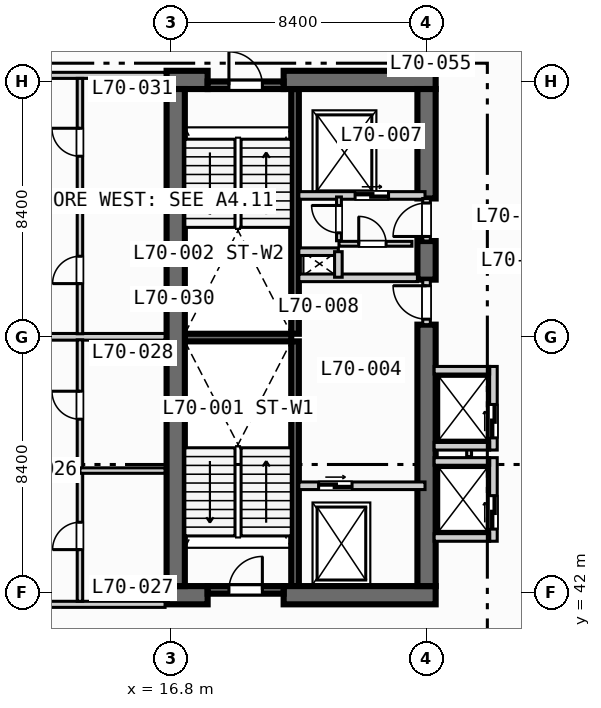
"""IFC4 building model, lengths in metres.
Left out: names, types, materials, properties, quantities, classifications, styles, units other than length and angle.
Written with IfcOpenShell. Run it as: python <this file> out.ifc"""

import sys

from ifc_helpers import new_model, si_unit, direction, frame, frame_2d, origin, place, context, subcontext, project, spatial, rectangle, extrude, element, fill, save


model = new_model("IFC4")
c1 = context("Model", 3, precision=1e-05, world=origin(), true_north=direction((0.0, 1.0)))
c2 = subcontext(c1, "Body", "Model", "MODEL_VIEW")
j1 = project(units=[si_unit("LENGTHUNIT", "METRE"), si_unit("PLANEANGLEUNIT", "RADIAN")], contexts=[c1])
p1 = place(None, origin())
s1 = spatial("IfcSite", under=j1, at=p1, CompositionType="ELEMENT")
p2 = place(p1, origin())
s2 = spatial("IfcBuilding", under=s1, at=p2, CompositionType="ELEMENT")
p3 = place(p2, frame((0.0, 0.0, 282.3)))
s3 = spatial("IfcBuildingStorey", under=s2, at=p3, CompositionType="ELEMENT", Elevation=282.3)
for number, where, z_axis, x_axis in (
    (1, (20.875, 42.2, 0.0), (0.0, 0.0, 1.0), (0.0, 1.0, 0.0)),
    (2, (20.875, 50.5, 0.0), (0.0, 0.0, 1.0), (0.0, 1.0, 0.0)),
):
    element("IfcWall", number, at=place(p3, frame(where, z_axis=z_axis, x_axis=x_axis)), inside=s3, PredefinedType="SOLIDWALL", context=c2, shape_type="SweptSolid", body=[
        extrude(rectangle(XDim=8.05, YDim=0.25, at=frame_2d((4.025, 0.0))), origin(), (0.0, 0.0, 1.0), 3.47),
    ])
p4 = place(p3, frame((17.25, 50.375, 0.0), z_axis=(0.0, 0.0, 1.0), x_axis=(1.0, 0.0, 0.0)))
e3 = element("IfcWall", 3, at=p4, inside=s3, PredefinedType="SOLIDWALL", context=c2, shape_type="SweptSolid", body=[
    extrude(rectangle(XDim=3.5, YDim=0.25, at=frame_2d((1.75, 0.0))), origin(), (0.0, 0.0, 1.0), 3.47),
])
p5 = place(p3, frame((16.65, 41.9, 0.0), z_axis=(0.0, 0.0, 1.0), x_axis=(1.0, 0.0, 0.0)))
e4 = element("IfcWall", 4, at=p5, inside=s3, PredefinedType="SHEAR", context=c2, shape_type="SweptSolid", body=[
    extrude(rectangle(XDim=1.35, YDim=0.6, at=frame_2d((0.675, 0.0))), origin(), (0.0, 0.0, 1.0), 3.47),
])
p6 = place(p3, frame((20.5, 41.9, 0.0), z_axis=(0.0, 0.0, 1.0), x_axis=(1.0, 0.0, 0.0)))
e5 = element("IfcWall", 5, at=p6, inside=s3, PredefinedType="SHEAR", context=c2, shape_type="SweptSolid", body=[
    extrude(rectangle(XDim=5.0, YDim=0.6, at=frame_2d((2.5, 0.0))), origin(), (0.0, 0.0, 1.0), 3.47),
])
p7 = place(p3, frame((16.65, 58.85, 0.0), z_axis=(0.0, 0.0, 1.0), x_axis=(1.0, 0.0, 0.0)))
e6 = element("IfcWall", 6, at=p7, inside=s3, PredefinedType="SHEAR", context=c2, shape_type="SweptSolid", body=[
    extrude(rectangle(XDim=1.35, YDim=0.6, at=frame_2d((0.675, 0.0))), origin(), (0.0, 0.0, 1.0), 3.47),
])
p8 = place(p3, frame((20.5, 58.85, 0.0), z_axis=(0.0, 0.0, 1.0), x_axis=(1.0, 0.0, 0.0)))
e7 = element("IfcWall", 7, at=p8, inside=s3, PredefinedType="SHEAR", context=c2, shape_type="SweptSolid", body=[
    extrude(rectangle(XDim=5.0, YDim=0.6, at=frame_2d((2.5, 0.0))), origin(), (0.0, 0.0, 1.0), 3.47),
])
p9 = place(p3, frame((16.95, 42.2, 0.0), z_axis=(0.0, 0.0, 1.0), x_axis=(0.0, 1.0, 0.0)))
e8 = element("IfcWall", 8, at=p9, inside=s3, PredefinedType="SHEAR", context=c2, shape_type="SweptSolid", body=[
    extrude(rectangle(XDim=16.35, YDim=0.6, at=frame_2d((8.175, 0.0))), origin(), (0.0, 0.0, 1.0), 3.47),
])
p10 = place(p3, frame((25.2, 42.2, 0.0), z_axis=(0.0, 0.0, 1.0), x_axis=(0.0, 1.0, 0.0)))
e9 = element("IfcWall", 9, at=p10, inside=s3, PredefinedType="SHEAR", context=c2, shape_type="SweptSolid", body=[
    extrude(rectangle(XDim=8.6, YDim=0.6, at=frame_2d((4.3, 0.0))), origin(), (0.0, 0.0, 1.0), 3.47),
])
p11 = place(p3, frame((25.2, 52.28, 0.0), z_axis=(0.0, 0.0, 1.0), x_axis=(0.0, 1.0, 0.0)))
e10 = element("IfcWall", 10, at=p11, inside=s3, PredefinedType="SHEAR", context=c2, shape_type="SweptSolid", body=[
    extrude(rectangle(XDim=1.27, YDim=0.6, at=frame_2d((0.635, 0.0))), origin(), (0.0, 0.0, 1.0), 3.47),
])
p12 = place(p3, frame((25.2, 54.95, 0.0), z_axis=(0.0, 0.0, 1.0), x_axis=(0.0, 1.0, 0.0)))
e11 = element("IfcWall", 11, at=p12, inside=s3, PredefinedType="SHEAR", context=c2, shape_type="SweptSolid", body=[
    extrude(rectangle(XDim=3.6, YDim=0.6, at=frame_2d((1.8, 0.0))), origin(), (0.0, 0.0, 1.0), 3.47),
])
p13 = place(p3, frame((18.0, 42.075, 0.0), z_axis=(0.0, 0.0, 1.0), x_axis=(1.0, 0.0, 0.0)))
e12 = element("IfcWall", 12, at=p13, inside=s3, PredefinedType="SOLIDWALL", context=c2, shape_type="SweptSolid", body=[
    extrude(rectangle(XDim=2.5, YDim=0.25, at=frame_2d((1.25, 0.0))), origin(), (0.0, 0.0, 1.0), 3.47),
])
p14 = place(p13, frame((0.7, 0.0, 0.0)))
e13 = element("IfcOpeningElement", 13, at=p14, cuts=e12, PredefinedType="OPENING", context=c2, shape_type="SweptSolid", body=[
    extrude(rectangle(XDim=1.1, YDim=2.15, at=frame_2d((0.55, 1.075))), frame((0.0, 0.135, 0.0), z_axis=(0.0, -1.0, 0.0), x_axis=(1.0, 0.0, 0.0)), (0.0, 0.0, 1.0), 0.27),
])
p15 = place(p3, frame((18.0, 58.675, 0.0), z_axis=(0.0, 0.0, 1.0), x_axis=(1.0, 0.0, 0.0)))
e14 = element("IfcWall", 14, at=p15, inside=s3, PredefinedType="SOLIDWALL", context=c2, shape_type="SweptSolid", body=[
    extrude(rectangle(XDim=2.5, YDim=0.25, at=frame_2d((1.25, 0.0))), origin(), (0.0, 0.0, 1.0), 3.47),
])
p16 = place(p15, frame((0.7, 0.0, 0.0)))
e15 = element("IfcOpeningElement", 15, at=p16, cuts=e14, PredefinedType="OPENING", context=c2, shape_type="SweptSolid", body=[
    extrude(rectangle(XDim=1.1, YDim=2.15, at=frame_2d((0.55, 1.075))), frame((0.0, 0.135, 0.0), z_axis=(0.0, -1.0, 0.0), x_axis=(1.0, 0.0, 0.0)), (0.0, 0.0, 1.0), 0.27),
])
p17 = place(p3, frame((21.0, 45.5, 0.0), z_axis=(0.0, 0.0, 1.0), x_axis=(1.0, 0.0, 0.0)))
e16 = element("IfcWall", 16, at=p17, inside=s3, PredefinedType="SOLIDWALL", context=c2, shape_type="SweptSolid", body=[
    extrude(rectangle(XDim=4.15, YDim=0.25, at=frame_2d((2.075, 0.0))), origin(), (0.0, 0.0, 1.0), 3.47),
])
p18 = place(p17, frame((0.65, 0.0, 0.0)))
e17 = element("IfcOpeningElement", 17, at=p18, cuts=e16, PredefinedType="OPENING", context=c2, shape_type="SweptSolid", body=[
    extrude(rectangle(XDim=1.1, YDim=2.15, at=frame_2d((0.55, 1.075))), frame((0.0, 0.135, 0.0), z_axis=(0.0, -1.0, 0.0), x_axis=(1.0, 0.0, 0.0)), (0.0, 0.0, 1.0), 0.27),
])
p19 = place(p3, frame((25.2, 50.8, 0.0), z_axis=(0.0, 0.0, 1.0), x_axis=(0.0, 1.0, 0.0)))
e18 = element("IfcWall", 18, at=p19, inside=s3, PredefinedType="SOLIDWALL", context=c2, shape_type="SweptSolid", body=[
    extrude(rectangle(XDim=1.48, YDim=0.25, at=frame_2d((0.74, 0.0))), origin(), (0.0, 0.0, 1.0), 3.47),
])
p20 = place(p19, frame((0.18, 0.0, 0.0)))
e19 = element("IfcOpeningElement", 19, at=p20, cuts=e18, PredefinedType="OPENING", context=c2, shape_type="SweptSolid", body=[
    extrude(rectangle(XDim=1.1, YDim=2.15, at=frame_2d((0.55, 1.075))), frame((0.0, 0.135, 0.0), z_axis=(0.0, -1.0, 0.0), x_axis=(1.0, 0.0, 0.0)), (0.0, 0.0, 1.0), 0.27),
])
p21 = place(p3, frame((21.0, 52.34, 0.0), z_axis=(0.0, 0.0, 1.0), x_axis=(1.0, 0.0, 0.0)))
e20 = element("IfcWall", 20, at=p21, inside=s3, PredefinedType="SOLIDWALL", context=c2, shape_type="SweptSolid", body=[
    extrude(rectangle(XDim=3.9, YDim=0.25, at=frame_2d((1.95, 0.0))), origin(), (0.0, 0.0, 1.0), 3.47),
])
p22 = place(p3, frame((21.0, 55.05, 0.0), z_axis=(0.0, 0.0, 1.0), x_axis=(1.0, 0.0, 0.0)))
e21 = element("IfcWall", 21, at=p22, inside=s3, PredefinedType="SOLIDWALL", context=c2, shape_type="SweptSolid", body=[
    extrude(rectangle(XDim=4.15, YDim=0.25, at=frame_2d((2.075, 0.0))), origin(), (0.0, 0.0, 1.0), 3.47),
])
p23 = place(p22, frame((1.85, 0.0, 0.0)))
e22 = element("IfcOpeningElement", 22, at=p23, cuts=e21, PredefinedType="OPENING", context=c2, shape_type="SweptSolid", body=[
    extrude(rectangle(XDim=1.1, YDim=2.15, at=frame_2d((0.55, 1.075))), frame((0.0, 0.135, 0.0), z_axis=(0.0, -1.0, 0.0), x_axis=(1.0, 0.0, 0.0)), (0.0, 0.0, 1.0), 0.27),
])
p24 = place(p3, frame((25.2, 53.55, 0.0), z_axis=(0.0, 0.0, 1.0), x_axis=(0.0, 1.0, 0.0)))
e23 = element("IfcWall", 23, at=p24, inside=s3, PredefinedType="SOLIDWALL", context=c2, shape_type="SweptSolid", body=[
    extrude(rectangle(XDim=1.4, YDim=0.25, at=frame_2d((0.7, 0.0))), origin(), (0.0, 0.0, 1.0), 3.47),
])
p25 = place(p24, frame((0.15, 0.0, 0.0)))
e24 = element("IfcOpeningElement", 24, at=p25, cuts=e23, PredefinedType="OPENING", context=c2, shape_type="SweptSolid", body=[
    extrude(rectangle(XDim=1.1, YDim=2.15, at=frame_2d((0.55, 1.075))), frame((0.0, 0.135, 0.0), z_axis=(0.0, -1.0, 0.0), x_axis=(1.0, 0.0, 0.0)), (0.0, 0.0, 1.0), 0.27),
])
p26 = place(p3, frame((21.0, 53.2, 0.0), z_axis=(0.0, 0.0, 1.0), x_axis=(1.0, 0.0, 0.0)))
e25 = element("IfcWall", 25, at=p26, inside=s3, PredefinedType="SOLIDWALL", context=c2, shape_type="SweptSolid", body=[
    extrude(rectangle(XDim=1.3, YDim=0.25, at=frame_2d((0.65, 0.0))), origin(), (0.0, 0.0, 1.0), 3.47),
])
p27 = place(p3, frame((22.3, 52.36, 0.0), z_axis=(0.0, 0.0, 1.0), x_axis=(0.0, 1.0, 0.0)))
e26 = element("IfcWall", 26, at=p27, inside=s3, PredefinedType="SOLIDWALL", context=c2, shape_type="SweptSolid", body=[
    extrude(rectangle(XDim=0.84, YDim=0.25, at=frame_2d((0.42, 0.0))), origin(), (0.0, 0.0, 1.0), 3.47),
])
p28 = place(p3, frame((22.32, 53.56, 0.0), z_axis=(0.0, 0.0, 1.0), x_axis=(0.0, 1.0, 0.0)))
e27 = element("IfcWall", 27, at=p28, inside=s3, PredefinedType="PARTITIONING", context=c2, shape_type="SweptSolid", body=[
    extrude(rectangle(XDim=1.44, YDim=0.16, at=frame_2d((0.72, 0.0))), origin(), (0.0, 0.0, 1.0), 3.47),
])
p29 = place(p28, frame((0.26, 0.0, 0.0)))
e28 = element("IfcOpeningElement", 28, at=p29, cuts=e27, PredefinedType="OPENING", context=c2, shape_type="SweptSolid", body=[
    extrude(rectangle(XDim=0.9, YDim=2.1, at=frame_2d((0.45, 1.05))), frame((0.0, 0.09, 0.0), z_axis=(0.0, -1.0, 0.0), x_axis=(1.0, 0.0, 0.0)), (0.0, 0.0, 1.0), 0.18),
])
p30 = place(p3, frame((22.32, 53.46, 0.0), z_axis=(0.0, 0.0, 1.0), x_axis=(1.0, 0.0, 0.0)))
e29 = element("IfcWall", 29, at=p30, inside=s3, PredefinedType="PARTITIONING", context=c2, shape_type="SweptSolid", body=[
    extrude(rectangle(XDim=2.4, YDim=0.16, at=frame_2d((1.2, 0.0))), origin(), (0.0, 0.0, 1.0), 3.47),
])
p31 = place(p30, frame((0.65, 0.0, 0.0)))
e30 = element("IfcOpeningElement", 30, at=p31, cuts=e29, PredefinedType="OPENING", context=c2, shape_type="SweptSolid", body=[
    extrude(rectangle(XDim=0.9, YDim=2.1, at=frame_2d((0.45, 1.05))), frame((0.0, 0.09, 0.0), z_axis=(0.0, -1.0, 0.0), x_axis=(1.0, 0.0, 0.0)), (0.0, 0.0, 1.0), 0.18),
])
p32 = place(p3, frame((27.4, 43.675, 0.0), z_axis=(0.0, 0.0, 1.0), x_axis=(0.0, 1.0, 0.0)))
e31 = element("IfcWall", 31, at=p32, inside=s3, PredefinedType="SOLIDWALL", context=c2, shape_type="SweptSolid", body=[
    extrude(rectangle(XDim=2.75, YDim=0.25, at=frame_2d((1.375, 0.0))), origin(), (0.0, 0.0, 1.0), 3.47),
])
p33 = place(p32, frame((0.4, 0.0, 0.0)))
e32 = element("IfcOpeningElement", 32, at=p33, cuts=e31, PredefinedType="OPENING", context=c2, shape_type="SweptSolid", body=[
    extrude(rectangle(XDim=1.1, YDim=2.15, at=frame_2d((0.55, 1.075))), frame((0.0, 0.135, 0.0), z_axis=(0.0, -1.0, 0.0), x_axis=(1.0, 0.0, 0.0)), (0.0, 0.0, 1.0), 0.27),
])
for number, where, z_axis, x_axis in (
    (33, (25.45, 43.8, 0.0), (0.0, 0.0, 1.0), (1.0, 0.0, 0.0)),
    (34, (25.45, 46.3, 0.0), (0.0, 0.0, 1.0), (1.0, 0.0, 0.0)),
):
    element("IfcWall", number, at=place(p3, frame(where, z_axis=z_axis, x_axis=x_axis)), inside=s3, PredefinedType="SOLIDWALL", context=c2, shape_type="SweptSolid", body=[
        extrude(rectangle(XDim=1.825, YDim=0.25, at=frame_2d((0.913, 0.0))), origin(), (0.0, 0.0, 1.0), 3.47),
    ])
p34 = place(p3, frame((26.6, 46.46, 0.0), z_axis=(0.0, 0.0, 1.0), x_axis=(0.0, 1.0, 0.0)))
e35 = element("IfcWall", 35, at=p34, inside=s3, PredefinedType="PARTITIONING", context=c2, shape_type="SweptSolid", body=[
    extrude(rectangle(XDim=0.88, YDim=0.16, at=frame_2d((0.44, 0.0))), origin(), (0.0, 0.0, 1.0), 3.47),
])
p35 = place(p3, frame((27.4, 46.675, 0.0), z_axis=(0.0, 0.0, 1.0), x_axis=(0.0, 1.0, 0.0)))
e36 = element("IfcWall", 36, at=p35, inside=s3, PredefinedType="SOLIDWALL", context=c2, shape_type="SweptSolid", body=[
    extrude(rectangle(XDim=2.75, YDim=0.25, at=frame_2d((1.375, 0.0))), origin(), (0.0, 0.0, 1.0), 3.47),
])
p36 = place(p35, frame((0.4, 0.0, 0.0)))
e37 = element("IfcOpeningElement", 37, at=p36, cuts=e36, PredefinedType="OPENING", context=c2, shape_type="SweptSolid", body=[
    extrude(rectangle(XDim=1.1, YDim=2.15, at=frame_2d((0.55, 1.075))), frame((0.0, 0.135, 0.0), z_axis=(0.0, -1.0, 0.0), x_axis=(1.0, 0.0, 0.0)), (0.0, 0.0, 1.0), 0.27),
])
for number, where, z_axis, x_axis in (
    (38, (25.45, 46.8, 0.0), (0.0, 0.0, 1.0), (1.0, 0.0, 0.0)),
    (39, (25.45, 49.3, 0.0), (0.0, 0.0, 1.0), (1.0, 0.0, 0.0)),
):
    element("IfcWall", number, at=place(p3, frame(where, z_axis=z_axis, x_axis=x_axis)), inside=s3, PredefinedType="SOLIDWALL", context=c2, shape_type="SweptSolid", body=[
        extrude(rectangle(XDim=1.825, YDim=0.25, at=frame_2d((0.913, 0.0))), origin(), (0.0, 0.0, 1.0), 3.47),
    ])
p37 = place(p3, frame((8.65, 41.6, 0.0), z_axis=(0.0, 0.0, 1.0), x_axis=(1.0, 0.0, 0.0)))
e40 = element("IfcWall", 40, at=p37, inside=s3, PredefinedType="PARTITIONING", context=c2, shape_type="SweptSolid", body=[
    extrude(rectangle(XDim=7.95, YDim=0.2, at=frame_2d((3.975, 0.0))), origin(), (0.0, 0.0, 1.0), 3.47),
])
p38 = place(p37, frame((2.0, 0.0, 0.0)))
e41 = element("IfcOpeningElement", 41, at=p38, cuts=e40, PredefinedType="OPENING", context=c2, shape_type="SweptSolid", body=[
    extrude(rectangle(XDim=1.0, YDim=2.15, at=frame_2d((0.5, 1.075))), frame((0.0, 0.11, 0.0), z_axis=(0.0, -1.0, 0.0), x_axis=(1.0, 0.0, 0.0)), (0.0, 0.0, 1.0), 0.22),
])
p39 = place(p3, frame((8.65, 59.0, 0.0), z_axis=(0.0, 0.0, 1.0), x_axis=(1.0, 0.0, 0.0)))
e42 = element("IfcWall", 42, at=p39, inside=s3, PredefinedType="PARTITIONING", context=c2, shape_type="SweptSolid", body=[
    extrude(rectangle(XDim=7.95, YDim=0.2, at=frame_2d((3.975, 0.0))), origin(), (0.0, 0.0, 1.0), 2.87),
])
p40 = place(p39, frame((2.0, 0.0, 0.0)))
e43 = element("IfcOpeningElement", 43, at=p40, cuts=e42, PredefinedType="OPENING", context=c2, shape_type="SweptSolid", body=[
    extrude(rectangle(XDim=1.0, YDim=2.15, at=frame_2d((0.5, 1.075))), frame((0.0, 0.11, 0.0), z_axis=(0.0, -1.0, 0.0), x_axis=(1.0, 0.0, 0.0)), (0.0, 0.0, 1.0), 0.22),
])
p41 = place(p3, frame((8.65, 50.4, 0.0), z_axis=(0.0, 0.0, 1.0), x_axis=(1.0, 0.0, 0.0)))
e44 = element("IfcWall", 44, at=p41, inside=s3, PredefinedType="PARTITIONING", context=c2, shape_type="SweptSolid", body=[
    extrude(rectangle(XDim=7.95, YDim=0.22, at=frame_2d((3.975, 0.0))), origin(), (0.0, 0.0, 1.0), 3.16),
])
p42 = place(p3, frame((13.8, 41.7, 0.0), z_axis=(0.0, 0.0, 1.0), x_axis=(0.0, 1.0, 0.0)))
e45 = element("IfcWall", 45, at=p42, inside=s3, PredefinedType="PLUMBINGWALL", context=c2, shape_type="SweptSolid", body=[
    extrude(rectangle(XDim=8.6, YDim=0.18, at=frame_2d((4.3, 0.0))), origin(), (0.0, 0.0, 1.0), 3.47),
])
p43 = place(p42, frame((1.7, 0.0, 0.0)))
e46 = element("IfcOpeningElement", 46, at=p43, cuts=e45, PredefinedType="OPENING", context=c2, shape_type="SweptSolid", body=[
    extrude(rectangle(XDim=0.9, YDim=2.1, at=frame_2d((0.45, 1.05))), frame((0.0, 0.1, 0.0), z_axis=(0.0, -1.0, 0.0), x_axis=(1.0, 0.0, 0.0)), (0.0, 0.0, 1.0), 0.2),
])
p44 = place(p42, frame((5.99, 0.0, 0.0)))
e47 = element("IfcOpeningElement", 47, at=p44, cuts=e45, PredefinedType="OPENING", context=c2, shape_type="SweptSolid", body=[
    extrude(rectangle(XDim=0.92, YDim=2.1, at=frame_2d((0.46, 1.05))), frame((0.0, 0.1, 0.0), z_axis=(0.0, -1.0, 0.0), x_axis=(1.0, 0.0, 0.0)), (0.0, 0.0, 1.0), 0.2),
])
p45 = place(p3, frame((13.8, 46.0, 0.0), z_axis=(0.0, 0.0, 1.0), x_axis=(1.0, 0.0, 0.0)))
e48 = element("IfcWall", 48, at=p45, inside=s3, PredefinedType="PLUMBINGWALL", context=c2, shape_type="SweptSolid", body=[
    extrude(rectangle(XDim=2.8, YDim=0.18, at=frame_2d((1.4, 0.0))), origin(), (0.0, 0.0, 1.0), 3.47),
])
p46 = place(p3, frame((13.8, 50.5, 0.0), z_axis=(0.0, 0.0, 1.0), x_axis=(0.0, 1.0, 0.0)))
e49 = element("IfcWall", 49, at=p46, inside=s3, PredefinedType="PLUMBINGWALL", context=c2, shape_type="SweptSolid", body=[
    extrude(rectangle(XDim=8.4, YDim=0.18, at=frame_2d((4.2, 0.0))), origin(), (0.0, 0.0, 1.0), 3.47),
])
p47 = place(p46, frame((1.65, 0.0, 0.0)))
e50 = element("IfcOpeningElement", 50, at=p47, cuts=e49, PredefinedType="OPENING", context=c2, shape_type="SweptSolid", body=[
    extrude(rectangle(XDim=0.9, YDim=2.1, at=frame_2d((0.45, 1.05))), frame((0.0, 0.1, 0.0), z_axis=(0.0, -1.0, 0.0), x_axis=(1.0, 0.0, 0.0)), (0.0, 0.0, 1.0), 0.2),
])
p48 = place(p46, frame((5.84, 0.0, 0.0)))
e51 = element("IfcOpeningElement", 51, at=p48, cuts=e49, PredefinedType="OPENING", context=c2, shape_type="SweptSolid", body=[
    extrude(rectangle(XDim=0.92, YDim=2.1, at=frame_2d((0.46, 1.05))), frame((0.0, 0.1, 0.0), z_axis=(0.0, -1.0, 0.0), x_axis=(1.0, 0.0, 0.0)), (0.0, 0.0, 1.0), 0.2),
])
p49 = place(p3, frame((13.8, 54.7, 0.0), z_axis=(0.0, 0.0, 1.0), x_axis=(1.0, 0.0, 0.0)))
e52 = element("IfcWall", 52, at=p49, inside=s3, PredefinedType="PLUMBINGWALL", context=c2, shape_type="SweptSolid", body=[
    extrude(rectangle(XDim=2.8, YDim=0.18, at=frame_2d((1.4, 0.0))), origin(), (0.0, 0.0, 1.0), 3.47),
])
p50 = place(p14, origin())
e53 = element("IfcDoor", 53, at=p50, inside=s3, OperationType="SINGLE_SWING_RIGHT", PredefinedType="DOOR", context=c2, shape_type="SweptSolid", body=[
    extrude(rectangle(XDim=1.1, YDim=2.15, at=frame_2d((0.55, 1.075))), frame((0.0, 0.025, 0.0), z_axis=(0.0, -1.0, 0.0), x_axis=(1.0, 0.0, 0.0)), (0.0, 0.0, 1.0), 0.05),
])
fill(e13, e53)
p51 = place(p16, origin())
e54 = element("IfcDoor", 54, at=p51, inside=s3, OperationType="SINGLE_SWING_LEFT", PredefinedType="DOOR", context=c2, shape_type="SweptSolid", body=[
    extrude(rectangle(XDim=1.1, YDim=2.15, at=frame_2d((0.55, 1.075))), frame((0.0, 0.025, 0.0), z_axis=(0.0, -1.0, 0.0), x_axis=(1.0, 0.0, 0.0)), (0.0, 0.0, 1.0), 0.05),
])
fill(e15, e54)
p52 = place(p18, origin())
e55 = element("IfcDoor", 55, at=p52, inside=s3, OperationType="SLIDING_TO_LEFT", PredefinedType="DOOR", context=c2, shape_type="SweptSolid", body=[
    extrude(rectangle(XDim=1.1, YDim=2.15, at=frame_2d((0.55, 1.075))), frame((0.0, 0.025, 0.0), z_axis=(0.0, -1.0, 0.0), x_axis=(1.0, 0.0, 0.0)), (0.0, 0.0, 1.0), 0.05),
])
fill(e17, e55)
p53 = place(p20, origin())
e56 = element("IfcDoor", 56, at=p53, inside=s3, OperationType="SINGLE_SWING_RIGHT", PredefinedType="DOOR", context=c2, shape_type="SweptSolid", body=[
    extrude(rectangle(XDim=1.1, YDim=2.15, at=frame_2d((0.55, 1.075))), frame((0.0, 0.025, 0.0), z_axis=(0.0, -1.0, 0.0), x_axis=(1.0, 0.0, 0.0)), (0.0, 0.0, 1.0), 0.05),
])
fill(e19, e56)
p54 = place(p23, origin())
e57 = element("IfcDoor", 57, at=p54, inside=s3, OperationType="SLIDING_TO_LEFT", PredefinedType="DOOR", context=c2, shape_type="SweptSolid", body=[
    extrude(rectangle(XDim=1.1, YDim=2.15, at=frame_2d((0.55, 1.075))), frame((0.0, 0.025, 0.0), z_axis=(0.0, -1.0, 0.0), x_axis=(1.0, 0.0, 0.0)), (0.0, 0.0, 1.0), 0.05),
])
fill(e22, e57)
p55 = place(p25, origin())
e58 = element("IfcDoor", 58, at=p55, inside=s3, OperationType="SINGLE_SWING_LEFT", PredefinedType="DOOR", context=c2, shape_type="SweptSolid", body=[
    extrude(rectangle(XDim=1.1, YDim=2.15, at=frame_2d((0.55, 1.075))), frame((0.0, 0.025, 0.0), z_axis=(0.0, -1.0, 0.0), x_axis=(1.0, 0.0, 0.0)), (0.0, 0.0, 1.0), 0.05),
])
fill(e24, e58)
p56 = place(p29, origin())
e59 = element("IfcDoor", 59, at=p56, inside=s3, OperationType="SINGLE_SWING_RIGHT", PredefinedType="DOOR", context=c2, shape_type="SweptSolid", body=[
    extrude(rectangle(XDim=0.9, YDim=2.1, at=frame_2d((0.45, 1.05))), frame((0.0, 0.025, 0.0), z_axis=(0.0, -1.0, 0.0), x_axis=(1.0, 0.0, 0.0)), (0.0, 0.0, 1.0), 0.05),
])
fill(e28, e59)
p57 = place(p31, origin())
e60 = element("IfcDoor", 60, at=p57, inside=s3, OperationType="SINGLE_SWING_LEFT", PredefinedType="DOOR", context=c2, shape_type="SweptSolid", body=[
    extrude(rectangle(XDim=0.9, YDim=2.1, at=frame_2d((0.45, 1.05))), frame((0.0, 0.025, 0.0), z_axis=(0.0, -1.0, 0.0), x_axis=(1.0, 0.0, 0.0)), (0.0, 0.0, 1.0), 0.05),
])
fill(e30, e60)
p58 = place(p33, origin())
e61 = element("IfcDoor", 61, at=p58, inside=s3, OperationType="SLIDING_TO_LEFT", PredefinedType="DOOR", context=c2, shape_type="SweptSolid", body=[
    extrude(rectangle(XDim=1.1, YDim=2.15, at=frame_2d((0.55, 1.075))), frame((0.0, 0.025, 0.0), z_axis=(0.0, -1.0, 0.0), x_axis=(1.0, 0.0, 0.0)), (0.0, 0.0, 1.0), 0.05),
])
fill(e32, e61)
p59 = place(p36, origin())
e62 = element("IfcDoor", 62, at=p59, inside=s3, OperationType="SLIDING_TO_LEFT", PredefinedType="DOOR", context=c2, shape_type="SweptSolid", body=[
    extrude(rectangle(XDim=1.1, YDim=2.15, at=frame_2d((0.55, 1.075))), frame((0.0, 0.025, 0.0), z_axis=(0.0, -1.0, 0.0), x_axis=(1.0, 0.0, 0.0)), (0.0, 0.0, 1.0), 0.05),
])
fill(e37, e62)
p60 = place(p43, origin())
e63 = element("IfcDoor", 63, at=p60, inside=s3, OperationType="SINGLE_SWING_LEFT", PredefinedType="DOOR", context=c2, shape_type="SweptSolid", body=[
    extrude(rectangle(XDim=0.9, YDim=2.1, at=frame_2d((0.45, 1.05))), frame((0.0, 0.025, 0.0), z_axis=(0.0, -1.0, 0.0), x_axis=(1.0, 0.0, 0.0)), (0.0, 0.0, 1.0), 0.05),
])
fill(e46, e63)
p61 = place(p44, origin())
e64 = element("IfcDoor", 64, at=p61, inside=s3, OperationType="SINGLE_SWING_RIGHT", PredefinedType="DOOR", context=c2, shape_type="SweptSolid", body=[
    extrude(rectangle(XDim=0.92, YDim=2.1, at=frame_2d((0.46, 1.05))), frame((0.0, 0.025, 0.0), z_axis=(0.0, -1.0, 0.0), x_axis=(1.0, 0.0, 0.0)), (0.0, 0.0, 1.0), 0.05),
])
fill(e47, e64)
p62 = place(p47, origin())
e65 = element("IfcDoor", 65, at=p62, inside=s3, OperationType="SINGLE_SWING_LEFT", PredefinedType="DOOR", context=c2, shape_type="SweptSolid", body=[
    extrude(rectangle(XDim=0.9, YDim=2.1, at=frame_2d((0.45, 1.05))), frame((0.0, 0.025, 0.0), z_axis=(0.0, -1.0, 0.0), x_axis=(1.0, 0.0, 0.0)), (0.0, 0.0, 1.0), 0.05),
])
fill(e50, e65)
p63 = place(p48, origin())
e66 = element("IfcDoor", 66, at=p63, inside=s3, OperationType="SINGLE_SWING_RIGHT", PredefinedType="DOOR", context=c2, shape_type="SweptSolid", body=[
    extrude(rectangle(XDim=0.92, YDim=2.1, at=frame_2d((0.46, 1.05))), frame((0.0, 0.025, 0.0), z_axis=(0.0, -1.0, 0.0), x_axis=(1.0, 0.0, 0.0)), (0.0, 0.0, 1.0), 0.05),
])
fill(e51, e66)
save(model, sys.argv[1])
